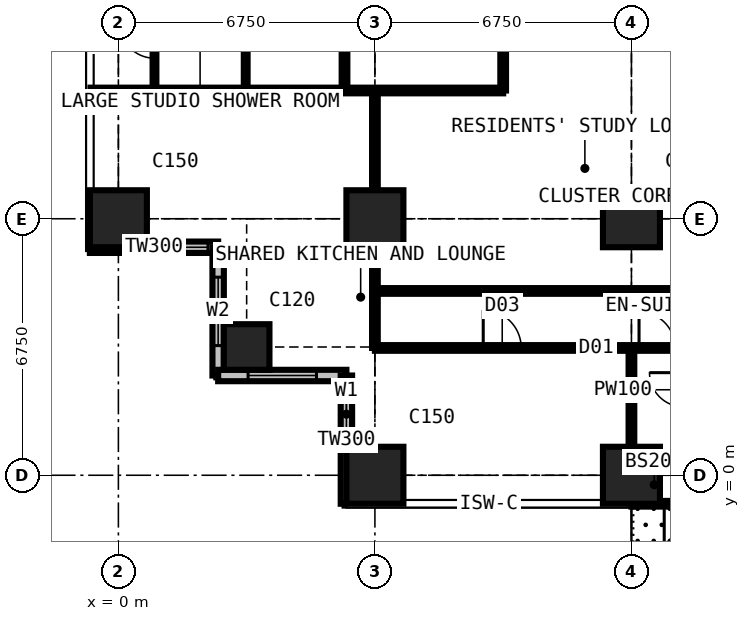
"""IFC4 building model, lengths in metres.
Left out: names, types, materials, properties, quantities, classifications, styles, units other than length and angle.
Written with IfcOpenShell. Run it as: python <this file> out.ifc"""

import sys

from ifc_helpers import new_model, si_unit, direction, frame, frame_2d, origin, origin_2d, place, context, subcontext, project, spatial, rectangle, extrude, element, fill, save


model = new_model("IFC4")
c1 = context("Model", 3, precision=1e-05, world=origin(), true_north=direction((0.0, 1.0)))
c2 = subcontext(c1, "Body", "Model", "MODEL_VIEW")
j1 = project(units=[si_unit("LENGTHUNIT", "METRE"), si_unit("PLANEANGLEUNIT", "RADIAN")], contexts=[c1])
p1 = place(None, origin())
s1 = spatial("IfcSite", under=j1, at=p1, CompositionType="ELEMENT")
p2 = place(p1, origin())
s2 = spatial("IfcBuilding", under=s1, at=p2, CompositionType="ELEMENT")
p3 = place(p2, frame((0.0, 0.0, 163.8)))
s3 = spatial("IfcBuildingStorey", under=s2, at=p3, CompositionType="ELEMENT", Elevation=163.8)
p4 = place(p3, frame((0.0, 6.75, 0.0), z_axis=(0.0, 0.0, 1.0), x_axis=(1.0, 0.0, 0.0)))
e1 = element("IfcColumn", 1, at=p4, inside=s3, PredefinedType="COLUMN", context=c2, shape_type="SweptSolid", body=[
    extrude(rectangle(XDim=1.5, YDim=1.5, at=origin_2d()), origin(), (0.0, 0.0, 1.0), 3.6),
])
p5 = place(p3, frame((3.375, 3.375, 0.0), z_axis=(0.0, 0.0, 1.0), x_axis=(1.0, 0.0, 0.0)))
e2 = element("IfcColumn", 2, at=p5, inside=s3, PredefinedType="COLUMN", context=c2, shape_type="SweptSolid", body=[
    extrude(rectangle(XDim=1.2, YDim=1.2, at=origin_2d()), origin(), (0.0, 0.0, 1.0), 3.6),
])
for number, where, z_axis, x_axis in (
    (3, (6.75, 0.0, 0.0), (0.0, 0.0, 1.0), (1.0, 0.0, 0.0)),
    (4, (6.75, 6.75, 0.0), (0.0, 0.0, 1.0), (1.0, 0.0, 0.0)),
    (5, (13.5, 0.0, 0.0), (0.0, 0.0, 1.0), (1.0, 0.0, 0.0)),
    (6, (13.5, 6.75, 0.0), (0.0, 0.0, 1.0), (1.0, 0.0, 0.0)),
):
    element("IfcColumn", number, at=place(p3, frame(where, z_axis=z_axis, x_axis=x_axis)), inside=s3, PredefinedType="COLUMN", context=c2, shape_type="SweptSolid", body=[
        extrude(rectangle(XDim=1.5, YDim=1.5, at=origin_2d()), origin(), (0.0, 0.0, 1.0), 3.6),
    ])
p6 = place(p3, frame((-0.75, 6.0, 0.0), z_axis=(0.0, 0.0, 1.0), x_axis=(1.0, 0.0, 0.0)))
e7 = element("IfcWall", 7, at=p6, inside=s3, PredefinedType="SOLIDWALL", context=c2, shape_type="SweptSolid", body=[
    extrude(rectangle(XDim=3.375, YDim=0.3, at=frame_2d((1.688, 0.0))), origin(), (0.0, 0.0, 1.0), 3.375),
])
p7 = place(p6, frame((1.607, 0.0, 0.9)))
e8 = element("IfcOpeningElement", 8, at=p7, cuts=e7, PredefinedType="OPENING", context=c2, shape_type="SweptSolid", body=[
    extrude(rectangle(XDim=1.5, YDim=1.8, at=frame_2d((0.75, 0.9))), frame((0.0, 0.16, 0.0), z_axis=(0.0, -1.0, 0.0), x_axis=(1.0, 0.0, 0.0)), (0.0, 0.0, 1.0), 0.32),
])
p8 = place(p3, frame((2.625, 6.0, 0.0), z_axis=(0.0, 0.0, 1.0), x_axis=(0.0, -1.0, 0.0)))
e9 = element("IfcWall", 9, at=p8, inside=s3, PredefinedType="SOLIDWALL", context=c2, shape_type="SweptSolid", body=[
    extrude(rectangle(XDim=3.375, YDim=0.3, at=frame_2d((1.688, 0.0))), origin(), (0.0, 0.0, 1.0), 3.375),
])
p9 = place(p8, frame((0.788, 0.0, 0.6)))
e10 = element("IfcOpeningElement", 10, at=p9, cuts=e9, PredefinedType="OPENING", context=c2, shape_type="SweptSolid", body=[
    extrude(rectangle(XDim=1.8, YDim=2.1, at=frame_2d((0.9, 1.05))), frame((0.0, 0.16, 0.0), z_axis=(0.0, -1.0, 0.0), x_axis=(1.0, 0.0, 0.0)), (0.0, 0.0, 1.0), 0.32),
])
p10 = place(p3, frame((2.625, 2.625, 0.0), z_axis=(0.0, 0.0, 1.0), x_axis=(1.0, 0.0, 0.0)))
e11 = element("IfcWall", 11, at=p10, inside=s3, PredefinedType="SOLIDWALL", context=c2, shape_type="SweptSolid", body=[
    extrude(rectangle(XDim=3.375, YDim=0.3, at=frame_2d((1.688, 0.0))), origin(), (0.0, 0.0, 1.0), 3.375),
])
p11 = place(p10, frame((0.788, 0.0, 0.6)))
e12 = element("IfcOpeningElement", 12, at=p11, cuts=e11, PredefinedType="OPENING", context=c2, shape_type="SweptSolid", body=[
    extrude(rectangle(XDim=1.8, YDim=2.1, at=frame_2d((0.9, 1.05))), frame((0.0, 0.16, 0.0), z_axis=(0.0, -1.0, 0.0), x_axis=(1.0, 0.0, 0.0)), (0.0, 0.0, 1.0), 0.32),
])
p12 = place(p3, frame((6.0, 2.625, 0.0), z_axis=(0.0, 0.0, 1.0), x_axis=(0.0, -1.0, 0.0)))
e13 = element("IfcWall", 13, at=p12, inside=s3, PredefinedType="SOLIDWALL", context=c2, shape_type="SweptSolid", body=[
    extrude(rectangle(XDim=3.375, YDim=0.3, at=frame_2d((1.688, 0.0))), origin(), (0.0, 0.0, 1.0), 3.375),
])
p13 = place(p12, frame((0.268, 0.0, 0.9)))
e14 = element("IfcOpeningElement", 14, at=p13, cuts=e13, PredefinedType="OPENING", context=c2, shape_type="SweptSolid", body=[
    extrude(rectangle(XDim=1.5, YDim=1.8, at=frame_2d((0.75, 0.9))), frame((0.0, 0.16, 0.0), z_axis=(0.0, -1.0, 0.0), x_axis=(1.0, 0.0, 0.0)), (0.0, 0.0, 1.0), 0.32),
])
p14 = place(p3, frame((20.25, -0.75, 0.0), z_axis=(0.0, 0.0, 1.0), x_axis=(-1.0, 0.0, 0.0)))
e15 = element("IfcWall", 15, at=p14, inside=s3, PredefinedType="SOLIDWALL", context=c2, shape_type="SweptSolid", body=[
    extrude(rectangle(XDim=6.75, YDim=0.15, at=frame_2d((3.375, 0.0))), origin(), (0.0, 0.0, 1.0), 3.375),
])
p15 = place(p14, frame((0.863, 0.0, 0.0)))
e16 = element("IfcOpeningElement", 16, at=p15, cuts=e15, PredefinedType="OPENING", context=c2, shape_type="SweptSolid", body=[
    extrude(rectangle(XDim=1.0, YDim=2.2, at=frame_2d((0.5, 1.1))), frame((0.0, 0.085, 0.0), z_axis=(0.0, -1.0, 0.0), x_axis=(1.0, 0.0, 0.0)), (0.0, 0.0, 1.0), 0.17),
])
p16 = place(p14, frame((1.975, 0.0, 0.9)))
e17 = element("IfcOpeningElement", 17, at=p16, cuts=e15, PredefinedType="OPENING", context=c2, shape_type="SweptSolid", body=[
    extrude(rectangle(XDim=1.2, YDim=1.8, at=frame_2d((0.6, 0.9))), frame((0.0, 0.085, 0.0), z_axis=(0.0, -1.0, 0.0), x_axis=(1.0, 0.0, 0.0)), (0.0, 0.0, 1.0), 0.17),
])
p17 = place(p14, frame((4.887, 0.0, 0.0)))
e18 = element("IfcOpeningElement", 18, at=p17, cuts=e15, PredefinedType="OPENING", context=c2, shape_type="SweptSolid", body=[
    extrude(rectangle(XDim=1.0, YDim=2.2, at=frame_2d((0.5, 1.1))), frame((0.0, 0.085, 0.0), z_axis=(0.0, -1.0, 0.0), x_axis=(1.0, 0.0, 0.0)), (0.0, 0.0, 1.0), 0.17),
])
p18 = place(p14, frame((3.575, 0.0, 0.9)))
e19 = element("IfcOpeningElement", 19, at=p18, cuts=e15, PredefinedType="OPENING", context=c2, shape_type="SweptSolid", body=[
    extrude(rectangle(XDim=1.2, YDim=1.8, at=frame_2d((0.6, 0.9))), frame((0.0, 0.085, 0.0), z_axis=(0.0, -1.0, 0.0), x_axis=(1.0, 0.0, 0.0)), (0.0, 0.0, 1.0), 0.17),
])
p19 = place(p3, frame((-0.734, 10.125, 0.0), z_axis=(0.0, 0.0, 1.0), x_axis=(1.0, 0.0, 0.0)))
e20 = element("IfcWall", 20, at=p19, inside=s3, PredefinedType="PARTITIONING", context=c2, shape_type="SweptSolid", body=[
    extrude(rectangle(XDim=10.859, YDim=0.15, at=frame_2d((5.429, 0.0))), origin(), (0.0, 0.0, 1.0), 3.375),
])
p20 = place(p3, frame((0.95, 10.125, 0.0), z_axis=(0.0, 0.0, 1.0), x_axis=(0.0, 1.0, 0.0)))
e21 = element("IfcWall", 21, at=p20, inside=s3, PredefinedType="PARTITIONING", context=c2, shape_type="SweptSolid", body=[
    extrude(rectangle(XDim=2.6, YDim=0.1, at=frame_2d((1.3, 0.0))), origin(), (0.0, 0.0, 1.0), 3.375),
])
p21 = place(p20, frame((0.85, 0.0, 0.0)))
e22 = element("IfcOpeningElement", 22, at=p21, cuts=e21, PredefinedType="OPENING", context=c2, shape_type="SweptSolid", body=[
    extrude(rectangle(XDim=0.9, YDim=2.2, at=frame_2d((0.45, 1.1))), frame((0.0, 0.06, 0.0), z_axis=(0.0, -1.0, 0.0), x_axis=(1.0, 0.0, 0.0)), (0.0, 0.0, 1.0), 0.12),
])
p22 = place(p3, frame((3.35, 10.125, 0.0), z_axis=(0.0, 0.0, 1.0), x_axis=(0.0, 1.0, 0.0)))
e23 = element("IfcWall", 23, at=p22, inside=s3, PredefinedType="PARTITIONING", context=c2, shape_type="SweptSolid", body=[
    extrude(rectangle(XDim=16.875, YDim=0.1, at=frame_2d((8.438, 0.0))), origin(), (0.0, 0.0, 1.0), 3.375),
])
p23 = place(p22, frame((4.2, 0.0, 0.0)))
e24 = element("IfcOpeningElement", 24, at=p23, cuts=e23, PredefinedType="OPENING", context=c2, shape_type="SweptSolid", body=[
    extrude(rectangle(XDim=0.95, YDim=2.2, at=frame_2d((0.475, 1.1))), frame((0.0, 0.06, 0.0), z_axis=(0.0, -1.0, 0.0), x_axis=(1.0, 0.0, 0.0)), (0.0, 0.0, 1.0), 0.12),
])
p24 = place(p22, frame((10.95, 0.0, 0.0)))
e25 = element("IfcOpeningElement", 25, at=p24, cuts=e23, PredefinedType="OPENING", context=c2, shape_type="SweptSolid", body=[
    extrude(rectangle(XDim=0.95, YDim=2.2, at=frame_2d((0.475, 1.1))), frame((0.0, 0.06, 0.0), z_axis=(0.0, -1.0, 0.0), x_axis=(1.0, 0.0, 0.0)), (0.0, 0.0, 1.0), 0.12),
])
p25 = place(p3, frame((5.95, 10.125, 0.0), z_axis=(0.0, 0.0, 1.0), x_axis=(0.0, 1.0, 0.0)))
e26 = element("IfcWall", 26, at=p25, inside=s3, PredefinedType="PARTITIONING", context=c2, shape_type="SweptSolid", body=[
    extrude(rectangle(XDim=2.65, YDim=0.15, at=frame_2d((1.325, 0.0))), origin(), (0.0, 0.0, 1.0), 3.375),
])
p26 = place(p3, frame((6.75, 3.35, 0.0), z_axis=(0.0, 0.0, 1.0), x_axis=(0.0, 1.0, 0.0)))
e27 = element("IfcWall", 27, at=p26, inside=s3, PredefinedType="PARTITIONING", context=c2, shape_type="SweptSolid", body=[
    extrude(rectangle(XDim=6.775, YDim=0.15, at=frame_2d((3.387, 0.0))), origin(), (0.0, 0.0, 1.0), 2.877),
])
p27 = place(p3, frame((6.75, 3.35, 0.0), z_axis=(0.0, 0.0, 1.0), x_axis=(1.0, 0.0, 0.0)))
e28 = element("IfcWall", 28, at=p27, inside=s3, PredefinedType="PARTITIONING", context=c2, shape_type="SweptSolid", body=[
    extrude(rectangle(XDim=20.25, YDim=0.15, at=frame_2d((10.125, 0.0))), origin(), (0.0, 0.0, 1.0), 3.375),
])
p28 = place(p27, frame((2.85, 0.0, 0.0)))
e29 = element("IfcOpeningElement", 29, at=p28, cuts=e28, PredefinedType="OPENING", context=c2, shape_type="SweptSolid", body=[
    extrude(rectangle(XDim=1.0, YDim=2.2, at=frame_2d((0.5, 1.1))), frame((0.0, 0.085, 0.0), z_axis=(0.0, -1.0, 0.0), x_axis=(1.0, 0.0, 0.0)), (0.0, 0.0, 1.0), 0.17),
])
p29 = place(p27, frame((6.95, 0.0, 0.0)))
e30 = element("IfcOpeningElement", 30, at=p29, cuts=e28, PredefinedType="OPENING", context=c2, shape_type="SweptSolid", body=[
    extrude(rectangle(XDim=0.95, YDim=2.2, at=frame_2d((0.475, 1.1))), frame((0.0, 0.085, 0.0), z_axis=(0.0, -1.0, 0.0), x_axis=(1.0, 0.0, 0.0)), (0.0, 0.0, 1.0), 0.17),
])
p30 = place(p27, frame((10.325, 0.0, 0.0)))
e31 = element("IfcOpeningElement", 31, at=p30, cuts=e28, PredefinedType="OPENING", context=c2, shape_type="SweptSolid", body=[
    extrude(rectangle(XDim=0.95, YDim=2.2, at=frame_2d((0.475, 1.1))), frame((0.0, 0.085, 0.0), z_axis=(0.0, -1.0, 0.0), x_axis=(1.0, 0.0, 0.0)), (0.0, 0.0, 1.0), 0.17),
])
p31 = place(p27, frame((13.7, 0.0, 0.0)))
e32 = element("IfcOpeningElement", 32, at=p31, cuts=e28, PredefinedType="OPENING", context=c2, shape_type="SweptSolid", body=[
    extrude(rectangle(XDim=0.95, YDim=2.2, at=frame_2d((0.475, 1.1))), frame((0.0, 0.085, 0.0), z_axis=(0.0, -1.0, 0.0), x_axis=(1.0, 0.0, 0.0)), (0.0, 0.0, 1.0), 0.17),
])
p32 = place(p27, frame((17.075, 0.0, 0.0)))
e33 = element("IfcOpeningElement", 33, at=p32, cuts=e28, PredefinedType="OPENING", context=c2, shape_type="SweptSolid", body=[
    extrude(rectangle(XDim=0.95, YDim=2.2, at=frame_2d((0.475, 1.1))), frame((0.0, 0.085, 0.0), z_axis=(0.0, -1.0, 0.0), x_axis=(1.0, 0.0, 0.0)), (0.0, 0.0, 1.0), 0.17),
])
p33 = place(p3, frame((6.75, 4.85, 0.0), z_axis=(0.0, 0.0, 1.0), x_axis=(1.0, 0.0, 0.0)))
e34 = element("IfcWall", 34, at=p33, inside=s3, PredefinedType="PARTITIONING", context=c2, shape_type="SweptSolid", body=[
    extrude(rectangle(XDim=11.05, YDim=0.15, at=frame_2d((5.525, 0.0))), origin(), (0.0, 0.0, 1.0), 3.375),
])
p34 = place(p3, frame((10.125, 10.125, 0.0), z_axis=(0.0, 0.0, 1.0), x_axis=(0.0, 1.0, 0.0)))
e35 = element("IfcWall", 35, at=p34, inside=s3, PredefinedType="PARTITIONING", context=c2, shape_type="SweptSolid", body=[
    extrude(rectangle(XDim=1.175, YDim=0.15, at=frame_2d((0.587, 0.0))), origin(), (0.0, 0.0, 1.0), 3.375),
])
p35 = place(p3, frame((13.5, -0.734, 0.0), z_axis=(0.0, 0.0, 1.0), x_axis=(0.0, 1.0, 0.0)))
e36 = element("IfcWall", 36, at=p35, inside=s3, PredefinedType="PARTITIONING", context=c2, shape_type="SweptSolid", body=[
    extrude(rectangle(XDim=4.084, YDim=0.15, at=frame_2d((2.042, 0.0))), origin(), (0.0, 0.0, 1.0), 2.877),
])
p36 = place(p7, origin())
e37 = element("IfcWindow", 37, at=p36, inside=s3, PartitioningType="SINGLE_PANEL", PredefinedType="WINDOW", context=c2, shape_type="SweptSolid", body=[
    extrude(rectangle(XDim=1.5, YDim=1.8, at=frame_2d((0.75, 0.9))), frame((0.0, 0.03, 0.0), z_axis=(0.0, -1.0, 0.0), x_axis=(1.0, 0.0, 0.0)), (0.0, 0.0, 1.0), 0.06),
])
fill(e8, e37)
p37 = place(p9, origin())
e38 = element("IfcWindow", 38, at=p37, inside=s3, PartitioningType="SINGLE_PANEL", PredefinedType="WINDOW", context=c2, shape_type="SweptSolid", body=[
    extrude(rectangle(XDim=1.8, YDim=2.1, at=frame_2d((0.9, 1.05))), frame((0.0, 0.03, 0.0), z_axis=(0.0, -1.0, 0.0), x_axis=(1.0, 0.0, 0.0)), (0.0, 0.0, 1.0), 0.06),
])
fill(e10, e38)
p38 = place(p11, origin())
e39 = element("IfcWindow", 39, at=p38, inside=s3, PartitioningType="SINGLE_PANEL", PredefinedType="WINDOW", context=c2, shape_type="SweptSolid", body=[
    extrude(rectangle(XDim=1.8, YDim=2.1, at=frame_2d((0.9, 1.05))), frame((0.0, 0.03, 0.0), z_axis=(0.0, -1.0, 0.0), x_axis=(1.0, 0.0, 0.0)), (0.0, 0.0, 1.0), 0.06),
])
fill(e12, e39)
p39 = place(p13, origin())
e40 = element("IfcWindow", 40, at=p39, inside=s3, PartitioningType="SINGLE_PANEL", PredefinedType="WINDOW", context=c2, shape_type="SweptSolid", body=[
    extrude(rectangle(XDim=1.5, YDim=1.8, at=frame_2d((0.75, 0.9))), frame((0.0, 0.03, 0.0), z_axis=(0.0, -1.0, 0.0), x_axis=(1.0, 0.0, 0.0)), (0.0, 0.0, 1.0), 0.06),
])
fill(e14, e40)
p40 = place(p17, origin())
e41 = element("IfcDoor", 41, at=p40, inside=s3, OperationType="SINGLE_SWING_RIGHT", PredefinedType="DOOR", context=c2, shape_type="SweptSolid", body=[
    extrude(rectangle(XDim=1.0, YDim=2.2, at=frame_2d((0.5, 1.1))), frame((0.0, 0.025, 0.0), z_axis=(0.0, -1.0, 0.0), x_axis=(1.0, 0.0, 0.0)), (0.0, 0.0, 1.0), 0.05),
])
fill(e18, e41)
p41 = place(p28, origin())
e42 = element("IfcDoor", 42, at=p41, inside=s3, OperationType="SINGLE_SWING_LEFT", PredefinedType="DOOR", context=c2, shape_type="SweptSolid", body=[
    extrude(rectangle(XDim=1.0, YDim=2.2, at=frame_2d((0.5, 1.1))), frame((0.0, 0.025, 0.0), z_axis=(0.0, -1.0, 0.0), x_axis=(1.0, 0.0, 0.0)), (0.0, 0.0, 1.0), 0.05),
])
fill(e29, e42)
p42 = place(p29, origin())
e43 = element("IfcDoor", 43, at=p42, inside=s3, OperationType="SINGLE_SWING_LEFT", PredefinedType="DOOR", context=c2, shape_type="SweptSolid", body=[
    extrude(rectangle(XDim=0.95, YDim=2.2, at=frame_2d((0.475, 1.1))), frame((0.0, 0.025, 0.0), z_axis=(0.0, -1.0, 0.0), x_axis=(1.0, 0.0, 0.0)), (0.0, 0.0, 1.0), 0.05),
])
fill(e30, e43)
p43 = place(p21, origin())
e44 = element("IfcDoor", 44, at=p43, inside=s3, OperationType="SINGLE_SWING_RIGHT", PredefinedType="DOOR", context=c2, shape_type="SweptSolid", body=[
    extrude(rectangle(XDim=0.9, YDim=2.2, at=frame_2d((0.45, 1.1))), frame((0.0, 0.025, 0.0), z_axis=(0.0, -1.0, 0.0), x_axis=(1.0, 0.0, 0.0)), (0.0, 0.0, 1.0), 0.05),
])
fill(e22, e44)
save(model, sys.argv[1])
